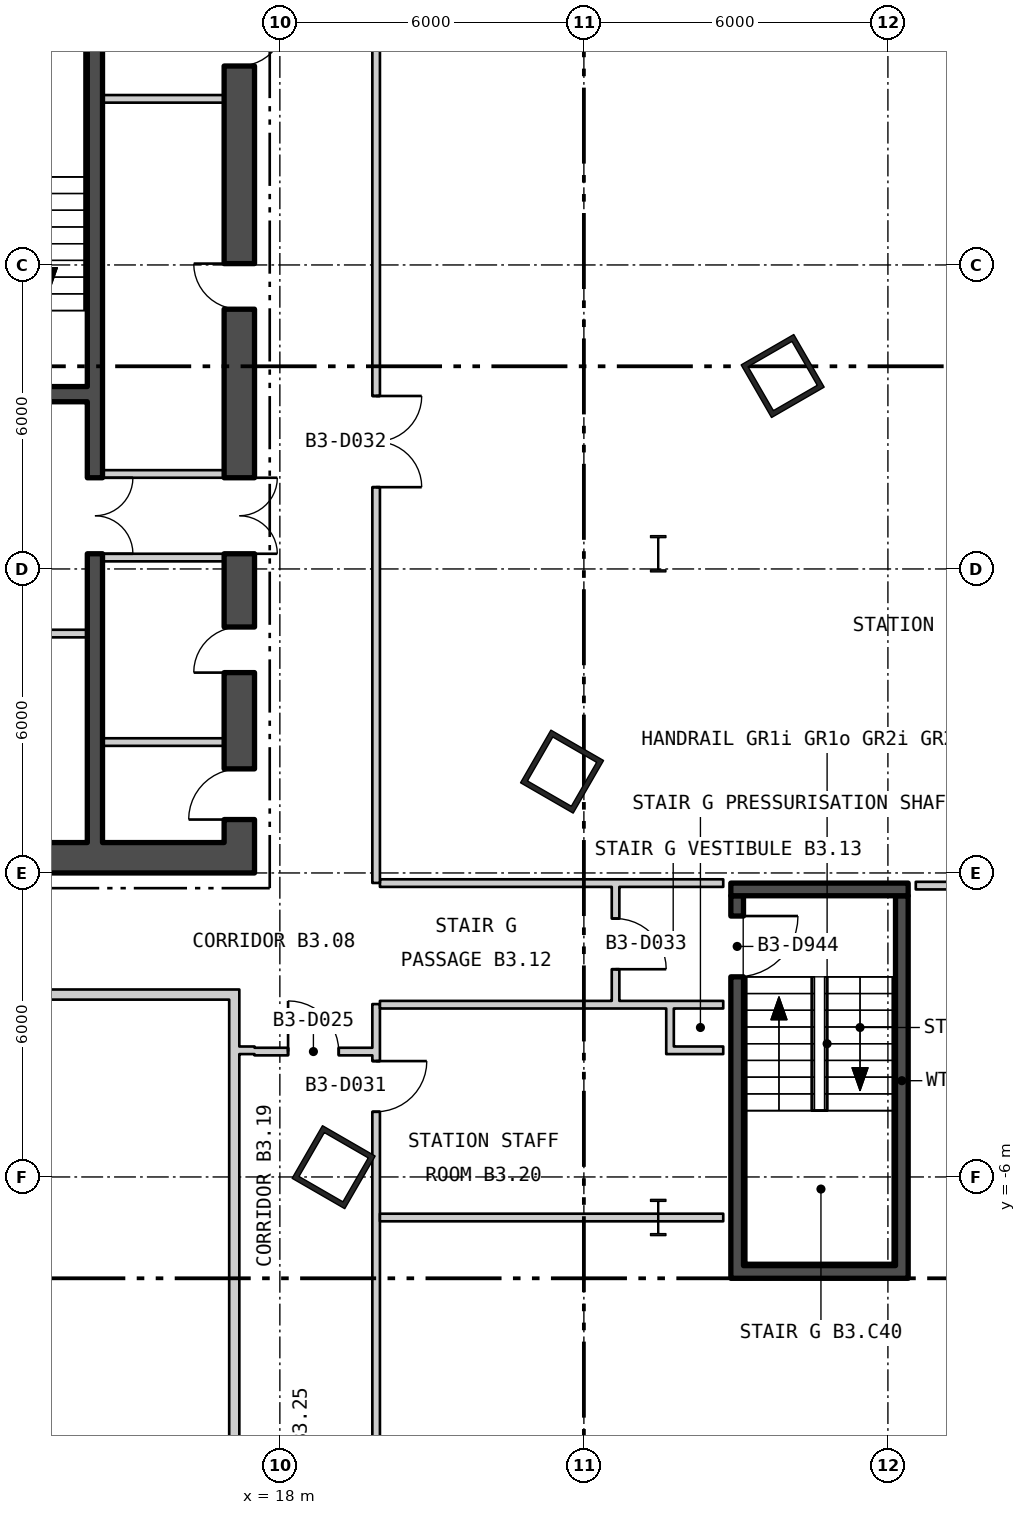
"""IFC4 building model, lengths in metres.
Left out: names, types, materials, properties, quantities, classifications, styles, units other than length and angle.
Written with IfcOpenShell. Run it as: python <this file> out.ifc"""

import sys

from ifc_helpers import new_model, si_unit, direction, frame, frame_2d, origin, origin_2d, place, context, subcontext, project, spatial, rectangle, hollow_rectangle, i_section, extrude, element, fill, save


model = new_model("IFC4")
c1 = context("Model", 3, precision=1e-05, world=origin(), true_north=direction((0.0, 1.0)))
c2 = subcontext(c1, "Body", "Model", "MODEL_VIEW")
j1 = project(units=[si_unit("LENGTHUNIT", "METRE"), si_unit("PLANEANGLEUNIT", "RADIAN")], contexts=[c1])
p1 = place(None, origin())
s1 = spatial("IfcSite", under=j1, at=p1, CompositionType="ELEMENT")
p2 = place(p1, origin())
s2 = spatial("IfcBuilding", under=s1, at=p2, CompositionType="ELEMENT")
p3 = place(p2, frame((0.0, 0.0, -16.8)))
s3 = spatial("IfcBuildingStorey", under=s2, at=p3, CompositionType="ELEMENT", Elevation=-16.8)
for number, where, z_axis, x_axis in (
    (1, (19.061, -5.807, 0.0), (0.0, 0.0, 1.0), (0.5, 0.866, 0.0)),
    (2, (23.569, 2.0, 0.0), (0.0, 0.0, 1.0), (0.5, 0.866, 0.0)),
    (3, (27.923, 9.808, 0.0), (0.0, 0.0, 1.0), (-0.5, 0.866, 0.0)),
):
    element("IfcColumn", number, at=place(p3, frame(where, z_axis=z_axis, x_axis=x_axis)), inside=s3, PredefinedType="COLUMN", context=c2, shape_type="SweptSolid", body=[
        extrude(hollow_rectangle(XDim=1.2, YDim=1.2, WallThickness=0.1, at=origin_2d()), origin(), (0.0, 0.0, 1.0), 5.4),
    ])
for number, where, z_axis, x_axis in (
    (4, (25.467, 6.3, 0.0), (0.0, 0.0, 1.0), (1.0, 0.0, 0.0)),
    (5, (25.467, -6.8, 0.0), (0.0, 0.0, 1.0), (1.0, 0.0, 0.0)),
):
    element("IfcColumn", number, at=place(p3, frame(where, z_axis=z_axis, x_axis=x_axis)), inside=s3, PredefinedType="COLUMN", context=c2, shape_type="SweptSolid", body=[
        extrude(i_section(OverallWidth=0.304, OverallDepth=0.716, WebThickness=0.021, FlangeThickness=0.04, at=origin_2d()), origin(), (0.0, 0.0, 1.0), 5.4),
    ])
p4 = place(p3, frame((-17.5, 0.3, 0.0), z_axis=(0.0, 0.0, 1.0), x_axis=(1.0, 0.0, 0.0)))
e6 = element("IfcWall", 6, at=p4, inside=s3, PredefinedType="SHEAR", context=c2, shape_type="SweptSolid", body=[
    extrude(rectangle(XDim=35.0, YDim=0.6, at=frame_2d((17.5, 0.0))), origin(), (0.0, 0.0, 1.0), 4.95),
])
p5 = place(p4, frame((12.0, 0.0, 0.0)))
e7 = element("IfcOpeningElement", 7, at=p5, cuts=e6, PredefinedType="OPENING", context=c2, shape_type="SweptSolid", body=[
    extrude(rectangle(XDim=1.8, YDim=2.4, at=frame_2d((0.9, 1.2))), frame((0.0, 0.31, 0.0), z_axis=(0.0, -1.0, 0.0), x_axis=(1.0, 0.0, 0.0)), (0.0, 0.0, 1.0), 0.62),
])
p6 = place(p4, frame((22.0, 0.0, 0.0)))
e8 = element("IfcOpeningElement", 8, at=p6, cuts=e6, PredefinedType="OPENING", context=c2, shape_type="SweptSolid", body=[
    extrude(rectangle(XDim=1.8, YDim=2.4, at=frame_2d((0.9, 1.2))), frame((0.0, 0.31, 0.0), z_axis=(0.0, -1.0, 0.0), x_axis=(1.0, 0.0, 0.0)), (0.0, 0.0, 1.0), 0.62),
])
p7 = place(p3, frame((17.2, 0.6, 0.0), z_axis=(0.0, 0.0, 1.0), x_axis=(0.0, 1.0, 0.0)))
e9 = element("IfcWall", 9, at=p7, inside=s3, PredefinedType="SHEAR", context=c2, shape_type="SweptSolid", body=[
    extrude(rectangle(XDim=16.8, YDim=0.6, at=frame_2d((8.4, 0.0))), origin(), (0.0, 0.0, 1.0), 4.95),
])
p8 = place(p7, frame((5.7, 0.0, 0.0)))
e10 = element("IfcOpeningElement", 10, at=p8, cuts=e9, PredefinedType="OPENING", context=c2, shape_type="SweptSolid", body=[
    extrude(rectangle(XDim=1.5, YDim=2.1, at=frame_2d((0.75, 1.05))), frame((0.0, 0.31, 0.0), z_axis=(0.0, -1.0, 0.0), x_axis=(1.0, 0.0, 0.0)), (0.0, 0.0, 1.0), 0.62),
])
p9 = place(p7, frame((0.454, 0.0, 0.0)))
e11 = element("IfcOpeningElement", 11, at=p9, cuts=e9, PredefinedType="OPENING", context=c2, shape_type="SweptSolid", body=[
    extrude(rectangle(XDim=1.0, YDim=2.1, at=frame_2d((0.5, 1.05))), frame((0.0, 0.31, 0.0), z_axis=(0.0, -1.0, 0.0), x_axis=(1.0, 0.0, 0.0)), (0.0, 0.0, 1.0), 0.62),
])
p10 = place(p7, frame((3.354, 0.0, 0.0)))
e12 = element("IfcOpeningElement", 12, at=p10, cuts=e9, PredefinedType="OPENING", context=c2, shape_type="SweptSolid", body=[
    extrude(rectangle(XDim=0.9, YDim=2.1, at=frame_2d((0.45, 1.05))), frame((0.0, 0.31, 0.0), z_axis=(0.0, -1.0, 0.0), x_axis=(1.0, 0.0, 0.0)), (0.0, 0.0, 1.0), 0.62),
])
p11 = place(p7, frame((10.527, 0.0, 0.0)))
e13 = element("IfcOpeningElement", 13, at=p11, cuts=e9, PredefinedType="OPENING", context=c2, shape_type="SweptSolid", body=[
    extrude(rectangle(XDim=0.9, YDim=2.1, at=frame_2d((0.45, 1.05))), frame((0.0, 0.31, 0.0), z_axis=(0.0, -1.0, 0.0), x_axis=(1.0, 0.0, 0.0)), (0.0, 0.0, 1.0), 0.62),
])
p12 = place(p7, frame((15.327, 0.0, 0.0)))
e14 = element("IfcOpeningElement", 14, at=p12, cuts=e9, PredefinedType="OPENING", context=c2, shape_type="SweptSolid", body=[
    extrude(rectangle(XDim=0.9, YDim=2.1, at=frame_2d((0.45, 1.05))), frame((0.0, 0.31, 0.0), z_axis=(0.0, -1.0, 0.0), x_axis=(1.0, 0.0, 0.0)), (0.0, 0.0, 1.0), 0.62),
])
p13 = place(p3, frame((14.35, 0.6, 0.0), z_axis=(0.0, 0.0, 1.0), x_axis=(0.0, 1.0, 0.0)))
e15 = element("IfcWall", 15, at=p13, inside=s3, PredefinedType="SHEAR", context=c2, shape_type="SweptSolid", body=[
    extrude(rectangle(XDim=16.8, YDim=0.3, at=frame_2d((8.4, 0.0))), origin(), (0.0, 0.0, 1.0), 4.95),
])
p14 = place(p13, frame((5.7, 0.0, 0.0)))
e16 = element("IfcOpeningElement", 16, at=p14, cuts=e15, PredefinedType="OPENING", context=c2, shape_type="SweptSolid", body=[
    extrude(rectangle(XDim=1.5, YDim=2.1, at=frame_2d((0.75, 1.05))), frame((0.0, 0.16, 0.0), z_axis=(0.0, -1.0, 0.0), x_axis=(1.0, 0.0, 0.0)), (0.0, 0.0, 1.0), 0.32),
])
p15 = place(p3, frame((11.0, 9.45, 0.0), z_axis=(0.0, 0.0, 1.0), x_axis=(1.0, 0.0, 0.0)))
e17 = element("IfcWall", 17, at=p15, inside=s3, PredefinedType="SHEAR", context=c2, shape_type="SweptSolid", body=[
    extrude(rectangle(XDim=3.2, YDim=0.3, at=frame_2d((1.6, 0.0))), origin(), (0.0, 0.0, 1.0), 4.95),
])
p16 = place(p15, frame((1.0, 0.0, 0.0)))
e18 = element("IfcOpeningElement", 18, at=p16, cuts=e17, PredefinedType="OPENING", context=c2, shape_type="SweptSolid", body=[
    extrude(rectangle(XDim=1.2, YDim=2.1, at=frame_2d((0.6, 1.05))), frame((0.0, 0.16, 0.0), z_axis=(0.0, -1.0, 0.0), x_axis=(1.0, 0.0, 0.0)), (0.0, 0.0, 1.0), 0.32),
])
p17 = place(p3, frame((11.0, 4.725, 0.0), z_axis=(0.0, 0.0, 1.0), x_axis=(1.0, 0.0, 0.0)))
e19 = element("IfcWall", 19, at=p17, inside=s3, PredefinedType="PARTITIONING", context=c2, shape_type="SweptSolid", body=[
    extrude(rectangle(XDim=3.2, YDim=0.15, at=frame_2d((1.6, 0.0))), origin(), (0.0, 0.0, 1.0), 4.95),
])
for number, where, z_axis, x_axis in (
    (20, (14.5, 6.225, 0.0), (0.0, 0.0, 1.0), (1.0, 0.0, 0.0)),
    (21, (14.5, 7.875, 0.0), (0.0, 0.0, 1.0), (1.0, 0.0, 0.0)),
    (22, (14.5, 2.583, 0.0), (0.0, 0.0, 1.0), (1.0, 0.0, 0.0)),
    (23, (14.5, 15.278, 0.0), (0.0, 0.0, 1.0), (1.0, 0.0, 0.0)),
):
    element("IfcWall", number, at=place(p3, frame(where, z_axis=z_axis, x_axis=x_axis)), inside=s3, PredefinedType="PARTITIONING", context=c2, shape_type="SweptSolid", body=[
        extrude(rectangle(XDim=2.4, YDim=0.15, at=frame_2d((1.2, 0.0))), origin(), (0.0, 0.0, 1.0), 4.95),
    ])
p18 = place(p3, frame((27.025, -7.75, 0.0), z_axis=(0.0, 0.0, 1.0), x_axis=(0.0, 1.0, 0.0)))
e24 = element("IfcWall", 24, at=p18, inside=s3, PredefinedType="SHEAR", context=c2, shape_type="SweptSolid", body=[
    extrude(rectangle(XDim=7.3, YDim=0.25, at=frame_2d((3.65, 0.0))), origin(), (0.0, 0.0, 1.0), 4.95),
])
p19 = place(p18, frame((5.7, 0.0, 0.0)))
e25 = element("IfcOpeningElement", 25, at=p19, cuts=e24, PredefinedType="OPENING", context=c2, shape_type="SweptSolid", body=[
    extrude(rectangle(XDim=1.2, YDim=2.1, at=frame_2d((0.6, 1.05))), frame((0.0, 0.135, 0.0), z_axis=(0.0, -1.0, 0.0), x_axis=(1.0, 0.0, 0.0)), (0.0, 0.0, 1.0), 0.27),
])
p20 = place(p3, frame((30.275, -7.75, 0.0), z_axis=(0.0, 0.0, 1.0), x_axis=(0.0, 1.0, 0.0)))
e26 = element("IfcWall", 26, at=p20, inside=s3, PredefinedType="SHEAR", context=c2, shape_type="SweptSolid", body=[
    extrude(rectangle(XDim=7.3, YDim=0.25, at=frame_2d((3.65, 0.0))), origin(), (0.0, 0.0, 1.0), 4.95),
])
for number, where, z_axis, x_axis in (
    (27, (26.9, -7.875, 0.0), (0.0, 0.0, 1.0), (1.0, 0.0, 0.0)),
    (28, (26.9, -0.325, 0.0), (0.0, 0.0, 1.0), (1.0, 0.0, 0.0)),
):
    element("IfcWall", number, at=place(p3, frame(where, z_axis=z_axis, x_axis=x_axis)), inside=s3, PredefinedType="SHEAR", context=c2, shape_type="SweptSolid", body=[
        extrude(rectangle(XDim=3.5, YDim=0.25, at=frame_2d((1.75, 0.0))), origin(), (0.0, 0.0, 1.0), 4.95),
    ])
p21 = place(p3, frame((12.722, -2.4, 0.0), z_axis=(0.0, 0.0, 1.0), x_axis=(1.0, 0.0, 0.0)))
e29 = element("IfcWall", 29, at=p21, inside=s3, PredefinedType="PARTITIONING", context=c2, shape_type="SweptSolid", body=[
    extrude(rectangle(XDim=4.278, YDim=0.2, at=frame_2d((2.139, 0.0))), origin(), (0.0, 0.0, 1.0), 4.95),
])
p22 = place(p3, frame((17.1, -21.4, 0.0), z_axis=(0.0, 0.0, 1.0), x_axis=(0.0, 1.0, 0.0)))
e30 = element("IfcWall", 30, at=p22, inside=s3, PredefinedType="PARTITIONING", context=c2, shape_type="SweptSolid", body=[
    extrude(rectangle(XDim=19.1, YDim=0.2, at=frame_2d((9.55, 0.0))), origin(), (0.0, 0.0, 1.0), 4.95),
])
p23 = place(p22, frame((7.4, 0.0, 0.0)))
e31 = element("IfcOpeningElement", 31, at=p23, cuts=e30, PredefinedType="OPENING", context=c2, shape_type="SweptSolid", body=[
    extrude(rectangle(XDim=1.1, YDim=2.1, at=frame_2d((0.55, 1.05))), frame((0.0, 0.11, 0.0), z_axis=(0.0, -1.0, 0.0), x_axis=(1.0, 0.0, 0.0)), (0.0, 0.0, 1.0), 0.22),
])
p24 = place(p3, frame((17.2, -3.5, 0.0), z_axis=(0.0, 0.0, 1.0), x_axis=(1.0, 0.0, 0.0)))
e32 = element("IfcWall", 32, at=p24, inside=s3, PredefinedType="PARTITIONING", context=c2, shape_type="SweptSolid", body=[
    extrude(rectangle(XDim=0.3, YDim=0.15, at=frame_2d((0.15, 0.0))), origin(), (0.0, 0.0, 1.0), 4.95),
])
p25 = place(p3, frame((17.5, -3.525, 0.0), z_axis=(0.0, 0.0, 1.0), x_axis=(1.0, 0.0, 0.0)))
e33 = element("IfcWall", 33, at=p25, inside=s3, PredefinedType="PARTITIONING", context=c2, shape_type="SweptSolid", body=[
    extrude(rectangle(XDim=2.325, YDim=0.15, at=frame_2d((1.163, 0.0))), origin(), (0.0, 0.0, 1.0), 4.95),
])
p26 = place(p25, frame((0.662, 0.0, 0.0)))
e34 = element("IfcOpeningElement", 34, at=p26, cuts=e33, PredefinedType="OPENING", context=c2, shape_type="SweptSolid", body=[
    extrude(rectangle(XDim=1.0, YDim=2.1, at=frame_2d((0.5, 1.05))), frame((0.0, 0.085, 0.0), z_axis=(0.0, -1.0, 0.0), x_axis=(1.0, 0.0, 0.0)), (0.0, 0.0, 1.0), 0.17),
])
p27 = place(p3, frame((19.9, -23.775, 0.0), z_axis=(0.0, 0.0, 1.0), x_axis=(0.0, 1.0, 0.0)))
e35 = element("IfcWall", 35, at=p27, inside=s3, PredefinedType="PARTITIONING", context=c2, shape_type="SweptSolid", body=[
    extrude(rectangle(XDim=21.187, YDim=0.15, at=frame_2d((10.594, 0.0))), origin(), (0.0, 0.0, 1.0), 4.95),
])
p28 = place(p27, frame((0.275, 0.0, 0.0)))
e36 = element("IfcOpeningElement", 36, at=p28, cuts=e35, PredefinedType="OPENING", context=c2, shape_type="SweptSolid", body=[
    extrude(rectangle(XDim=1.0, YDim=2.1, at=frame_2d((0.5, 1.05))), frame((0.0, 0.085, 0.0), z_axis=(0.0, -1.0, 0.0), x_axis=(1.0, 0.0, 0.0)), (0.0, 0.0, 1.0), 0.17),
])
p29 = place(p27, frame((4.942, 0.0, 0.0)))
e37 = element("IfcOpeningElement", 37, at=p29, cuts=e35, PredefinedType="OPENING", context=c2, shape_type="SweptSolid", body=[
    extrude(rectangle(XDim=1.8, YDim=2.1, at=frame_2d((0.9, 1.05))), frame((0.0, 0.085, 0.0), z_axis=(0.0, -1.0, 0.0), x_axis=(1.0, 0.0, 0.0)), (0.0, 0.0, 1.0), 0.17),
])
p30 = place(p27, frame((10.443, 0.0, 0.0)))
e38 = element("IfcOpeningElement", 38, at=p30, cuts=e35, PredefinedType="OPENING", context=c2, shape_type="SweptSolid", body=[
    extrude(rectangle(XDim=1.8, YDim=2.1, at=frame_2d((0.9, 1.05))), frame((0.0, 0.085, 0.0), z_axis=(0.0, -1.0, 0.0), x_axis=(1.0, 0.0, 0.0)), (0.0, 0.0, 1.0), 0.17),
])
p31 = place(p27, frame((19.062, 0.0, 0.0)))
e39 = element("IfcOpeningElement", 39, at=p31, cuts=e35, PredefinedType="OPENING", context=c2, shape_type="SweptSolid", body=[
    extrude(rectangle(XDim=1.0, YDim=2.1, at=frame_2d((0.5, 1.05))), frame((0.0, 0.085, 0.0), z_axis=(0.0, -1.0, 0.0), x_axis=(1.0, 0.0, 0.0)), (0.0, 0.0, 1.0), 0.17),
])
p32 = place(p3, frame((19.9, -0.197, 0.0), z_axis=(0.0, 0.0, 1.0), x_axis=(0.0, 1.0, 0.0)))
e40 = element("IfcWall", 40, at=p32, inside=s3, PredefinedType="PARTITIONING", context=c2, shape_type="SweptSolid", body=[
    extrude(rectangle(XDim=18.122, YDim=0.15, at=frame_2d((9.061, 0.0))), origin(), (0.0, 0.0, 1.0), 4.95),
])
p33 = place(p32, frame((7.811, 0.0, 0.0)))
e41 = element("IfcOpeningElement", 41, at=p33, cuts=e40, PredefinedType="OPENING", context=c2, shape_type="SweptSolid", body=[
    extrude(rectangle(XDim=1.8, YDim=2.1, at=frame_2d((0.9, 1.05))), frame((0.0, 0.085, 0.0), z_axis=(0.0, -1.0, 0.0), x_axis=(1.0, 0.0, 0.0)), (0.0, 0.0, 1.0), 0.17),
])
p34 = place(p3, frame((19.975, -6.8, 0.0), z_axis=(0.0, 0.0, 1.0), x_axis=(1.0, 0.0, 0.0)))
e42 = element("IfcWall", 42, at=p34, inside=s3, PredefinedType="PARTITIONING", context=c2, shape_type="SweptSolid", body=[
    extrude(rectangle(XDim=6.775, YDim=0.15, at=frame_2d((3.388, 0.0))), origin(), (0.0, 0.0, 1.0), 4.95),
])
p35 = place(p3, frame((19.975, -2.6, 0.0), z_axis=(0.0, 0.0, 1.0), x_axis=(1.0, 0.0, 0.0)))
e43 = element("IfcWall", 43, at=p35, inside=s3, PredefinedType="PARTITIONING", context=c2, shape_type="SweptSolid", body=[
    extrude(rectangle(XDim=5.713, YDim=0.15, at=frame_2d((2.857, 0.0))), origin(), (0.0, 0.0, 1.0), 4.95),
])
p36 = place(p3, frame((19.975, -0.2, 0.0), z_axis=(0.0, 0.0, 1.0), x_axis=(1.0, 0.0, 0.0)))
e44 = element("IfcWall", 44, at=p36, inside=s3, PredefinedType="PARTITIONING", context=c2, shape_type="SweptSolid", body=[
    extrude(rectangle(XDim=6.775, YDim=0.15, at=frame_2d((3.388, 0.0))), origin(), (0.0, 0.0, 1.0), 4.95),
])
p37 = place(p3, frame((24.625, -2.525, 0.0), z_axis=(0.0, 0.0, 1.0), x_axis=(0.0, 1.0, 0.0)))
e45 = element("IfcWall", 45, at=p37, inside=s3, PredefinedType="PARTITIONING", context=c2, shape_type="SweptSolid", body=[
    extrude(rectangle(XDim=2.25, YDim=0.15, at=frame_2d((1.125, 0.0))), origin(), (0.0, 0.0, 1.0), 4.95),
])
p38 = place(p37, frame((0.625, 0.0, 0.0)))
e46 = element("IfcOpeningElement", 46, at=p38, cuts=e45, PredefinedType="OPENING", context=c2, shape_type="SweptSolid", body=[
    extrude(rectangle(XDim=1.0, YDim=2.1, at=frame_2d((0.5, 1.05))), frame((0.0, 0.085, 0.0), z_axis=(0.0, -1.0, 0.0), x_axis=(1.0, 0.0, 0.0)), (0.0, 0.0, 1.0), 0.17),
])
p39 = place(p3, frame((25.625, -3.5, 0.0), z_axis=(0.0, 0.0, 1.0), x_axis=(1.0, 0.0, 0.0)))
e47 = element("IfcWall", 47, at=p39, inside=s3, PredefinedType="PARTITIONING", context=c2, shape_type="SweptSolid", body=[
    extrude(rectangle(XDim=1.125, YDim=0.15, at=frame_2d((0.562, 0.0))), origin(), (0.0, 0.0, 1.0), 4.95),
])
p40 = place(p3, frame((25.688, -2.6, 0.0), z_axis=(0.0, 0.0, 1.0), x_axis=(1.0, 0.0, 0.0)))
e48 = element("IfcWall", 48, at=p40, inside=s3, PredefinedType="PARTITIONING", context=c2, shape_type="SweptSolid", body=[
    extrude(rectangle(XDim=1.062, YDim=0.15, at=frame_2d((0.531, 0.0))), origin(), (0.0, 0.0, 1.0), 4.95),
])
p41 = place(p3, frame((25.7, -3.425, 0.0), z_axis=(0.0, 0.0, 1.0), x_axis=(0.0, 1.0, 0.0)))
e49 = element("IfcWall", 49, at=p41, inside=s3, PredefinedType="PARTITIONING", context=c2, shape_type="SweptSolid", body=[
    extrude(rectangle(XDim=0.75, YDim=0.15, at=frame_2d((0.375, 0.0))), origin(), (0.0, 0.0, 1.0), 4.95),
])
p42 = place(p3, frame((30.55, -0.25, 0.0), z_axis=(0.0, 0.0, 1.0), x_axis=(1.0, 0.0, 0.0)))
e50 = element("IfcWall", 50, at=p42, inside=s3, PredefinedType="PARTITIONING", context=c2, shape_type="SweptSolid", body=[
    extrude(rectangle(XDim=7.55, YDim=0.15, at=frame_2d((3.775, 0.0))), origin(), (0.0, 0.0, 1.0), 4.95),
])
p43 = place(p14, origin())
e51 = element("IfcDoor", 51, at=p43, inside=s3, OperationType="DOUBLE_DOOR_SINGLE_SWING", PredefinedType="DOOR", context=c2, shape_type="SweptSolid", body=[
    extrude(rectangle(XDim=1.5, YDim=2.1, at=frame_2d((0.75, 1.05))), frame((0.0, 0.025, 0.0), z_axis=(0.0, -1.0, 0.0), x_axis=(1.0, 0.0, 0.0)), (0.0, 0.0, 1.0), 0.05),
])
fill(e16, e51)
p44 = place(p8, origin())
e52 = element("IfcDoor", 52, at=p44, inside=s3, OperationType="DOUBLE_DOOR_SINGLE_SWING", PredefinedType="DOOR", context=c2, shape_type="SweptSolid", body=[
    extrude(rectangle(XDim=1.5, YDim=2.1, at=frame_2d((0.75, 1.05))), frame((0.0, 0.025, 0.0), z_axis=(0.0, -1.0, 0.0), x_axis=(1.0, 0.0, 0.0)), (0.0, 0.0, 1.0), 0.05),
])
fill(e10, e52)
p45 = place(p9, origin())
e53 = element("IfcDoor", 53, at=p45, inside=s3, OperationType="SINGLE_SWING_RIGHT", PredefinedType="DOOR", context=c2, shape_type="SweptSolid", body=[
    extrude(rectangle(XDim=1.0, YDim=2.1, at=frame_2d((0.5, 1.05))), frame((0.0, 0.025, 0.0), z_axis=(0.0, -1.0, 0.0), x_axis=(1.0, 0.0, 0.0)), (0.0, 0.0, 1.0), 0.05),
])
fill(e11, e53)
p46 = place(p10, origin())
e54 = element("IfcDoor", 54, at=p46, inside=s3, OperationType="SINGLE_SWING_RIGHT", PredefinedType="DOOR", context=c2, shape_type="SweptSolid", body=[
    extrude(rectangle(XDim=0.9, YDim=2.1, at=frame_2d((0.45, 1.05))), frame((0.0, 0.025, 0.0), z_axis=(0.0, -1.0, 0.0), x_axis=(1.0, 0.0, 0.0)), (0.0, 0.0, 1.0), 0.05),
])
fill(e12, e54)
p47 = place(p11, origin())
e55 = element("IfcDoor", 55, at=p47, inside=s3, OperationType="SINGLE_SWING_LEFT", PredefinedType="DOOR", context=c2, shape_type="SweptSolid", body=[
    extrude(rectangle(XDim=0.9, YDim=2.1, at=frame_2d((0.45, 1.05))), frame((0.0, 0.025, 0.0), z_axis=(0.0, -1.0, 0.0), x_axis=(1.0, 0.0, 0.0)), (0.0, 0.0, 1.0), 0.05),
])
fill(e13, e55)
p48 = place(p12, origin())
e56 = element("IfcDoor", 56, at=p48, inside=s3, OperationType="SINGLE_SWING_RIGHT", PredefinedType="DOOR", context=c2, shape_type="SweptSolid", body=[
    extrude(rectangle(XDim=0.9, YDim=2.1, at=frame_2d((0.45, 1.05))), frame((0.0, 0.025, 0.0), z_axis=(0.0, -1.0, 0.0), x_axis=(1.0, 0.0, 0.0)), (0.0, 0.0, 1.0), 0.05),
])
fill(e14, e56)
p49 = place(p19, origin())
e57 = element("IfcDoor", 57, at=p49, inside=s3, OperationType="SINGLE_SWING_RIGHT", PredefinedType="DOOR", context=c2, shape_type="SweptSolid", body=[
    extrude(rectangle(XDim=1.2, YDim=2.1, at=frame_2d((0.6, 1.05))), frame((0.0, 0.025, 0.0), z_axis=(0.0, -1.0, 0.0), x_axis=(1.0, 0.0, 0.0)), (0.0, 0.0, 1.0), 0.05),
])
fill(e25, e57)
p50 = place(p26, origin())
e58 = element("IfcDoor", 58, at=p50, inside=s3, OperationType="SINGLE_SWING_RIGHT", PredefinedType="DOOR", context=c2, shape_type="SweptSolid", body=[
    extrude(rectangle(XDim=1.0, YDim=2.1, at=frame_2d((0.5, 1.05))), frame((0.0, 0.025, 0.0), z_axis=(0.0, -1.0, 0.0), x_axis=(1.0, 0.0, 0.0)), (0.0, 0.0, 1.0), 0.05),
])
fill(e34, e58)
p51 = place(p31, origin())
e59 = element("IfcDoor", 59, at=p51, inside=s3, OperationType="SINGLE_SWING_RIGHT", PredefinedType="DOOR", context=c2, shape_type="SweptSolid", body=[
    extrude(rectangle(XDim=1.0, YDim=2.1, at=frame_2d((0.5, 1.05))), frame((0.0, 0.025, 0.0), z_axis=(0.0, -1.0, 0.0), x_axis=(1.0, 0.0, 0.0)), (0.0, 0.0, 1.0), 0.05),
])
fill(e39, e59)
p52 = place(p33, origin())
e60 = element("IfcDoor", 60, at=p52, inside=s3, OperationType="DOUBLE_DOOR_SINGLE_SWING", PredefinedType="DOOR", context=c2, shape_type="SweptSolid", body=[
    extrude(rectangle(XDim=1.8, YDim=2.1, at=frame_2d((0.9, 1.05))), frame((0.0, 0.025, 0.0), z_axis=(0.0, -1.0, 0.0), x_axis=(1.0, 0.0, 0.0)), (0.0, 0.0, 1.0), 0.05),
])
fill(e41, e60)
p53 = place(p38, origin())
e61 = element("IfcDoor", 61, at=p53, inside=s3, OperationType="SINGLE_SWING_LEFT", PredefinedType="DOOR", context=c2, shape_type="SweptSolid", body=[
    extrude(rectangle(XDim=1.0, YDim=2.1, at=frame_2d((0.5, 1.05))), frame((0.0, 0.025, 0.0), z_axis=(0.0, -1.0, 0.0), x_axis=(1.0, 0.0, 0.0)), (0.0, 0.0, 1.0), 0.05),
])
fill(e46, e61)
save(model, sys.argv[1])
